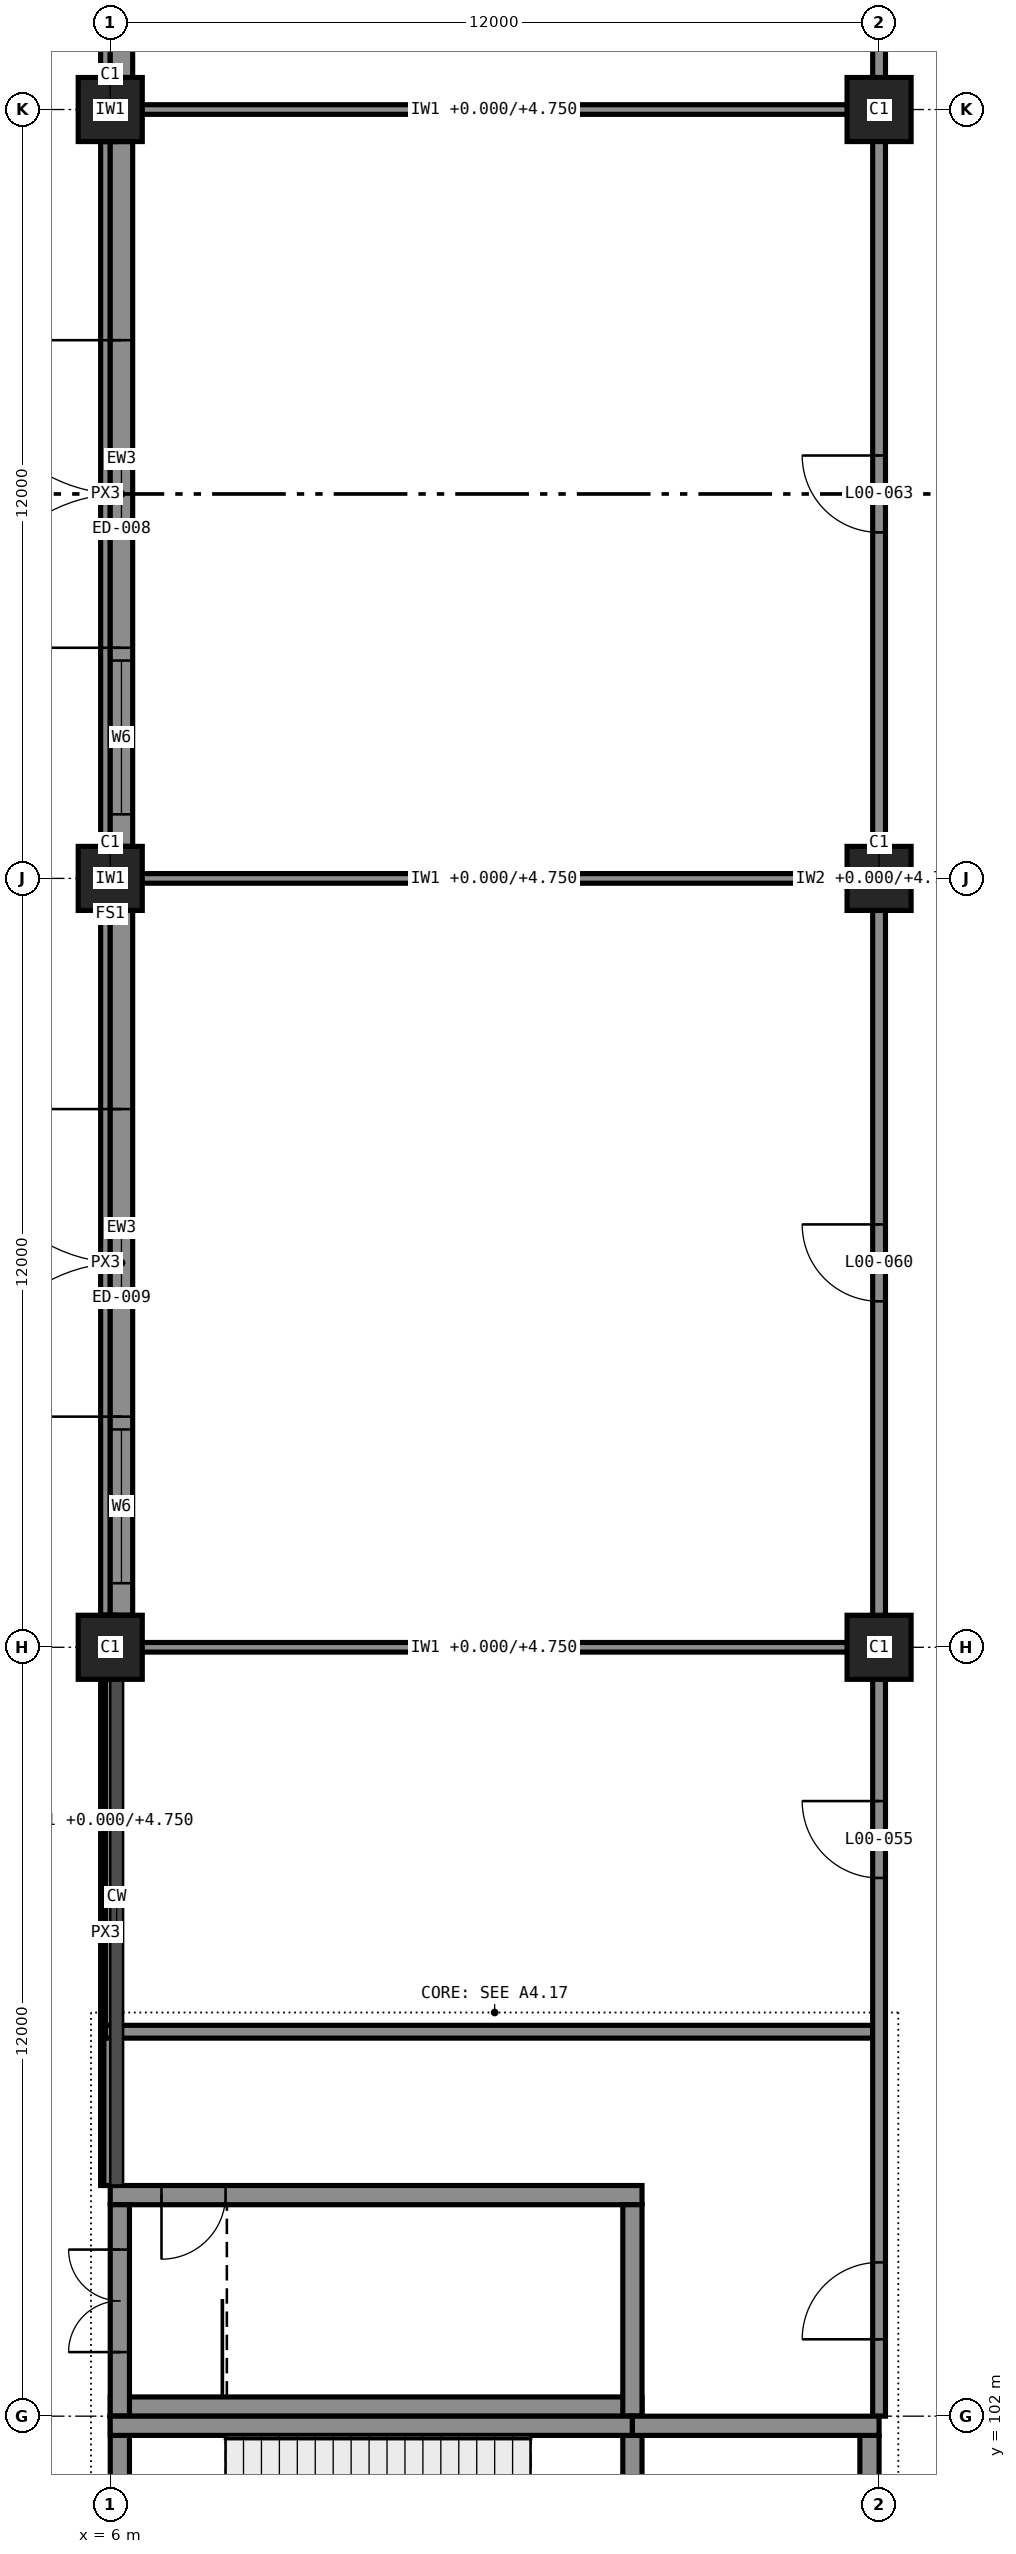
"""IFC4 building model, lengths in metres.
Left out: names, types, materials, properties, quantities, classifications, styles, units other than length and angle.
Written with IfcOpenShell. Run it as: python <this file> out.ifc"""

import sys

from ifc_helpers import new_model, si_unit, direction, frame, frame_2d, origin, origin_2d, place, context, subcontext, project, spatial, rectangle, extrude, element, fill, save


model = new_model("IFC4")
c1 = context("Model", 3, precision=1e-05, world=origin(), true_north=direction((0.0, 1.0)))
c2 = subcontext(c1, "Body", "Model", "MODEL_VIEW")
j1 = project(units=[si_unit("LENGTHUNIT", "METRE"), si_unit("PLANEANGLEUNIT", "RADIAN")], contexts=[c1])
p1 = place(None, origin())
s1 = spatial("IfcSite", under=j1, at=p1, CompositionType="ELEMENT")
p2 = place(p1, origin())
s2 = spatial("IfcBuilding", under=s1, at=p2, CompositionType="ELEMENT")
p3 = place(p2, origin())
s3 = spatial("IfcBuildingStorey", under=s2, at=p3, CompositionType="ELEMENT", Elevation=0.0)
for number, where, z_axis, x_axis in (
    (1, (6.0, 114.0, 0.0), (0.0, 0.0, 1.0), (1.0, 0.0, 0.0)),
    (2, (6.0, 126.0, 0.0), (0.0, 0.0, 1.0), (1.0, 0.0, 0.0)),
    (3, (6.0, 138.0, 0.0), (0.0, 0.0, 1.0), (1.0, 0.0, 0.0)),
    (4, (18.0, 114.0, 0.0), (0.0, 0.0, 1.0), (1.0, 0.0, 0.0)),
    (5, (18.0, 126.0, 0.0), (0.0, 0.0, 1.0), (1.0, 0.0, 0.0)),
    (6, (18.0, 138.0, 0.0), (0.0, 0.0, 1.0), (1.0, 0.0, 0.0)),
):
    element("IfcColumn", number, at=place(p3, frame(where, z_axis=z_axis, x_axis=x_axis)), inside=s3, PredefinedType="COLUMN", context=c2, shape_type="SweptSolid", body=[
        extrude(rectangle(XDim=1.0, YDim=1.0, at=origin_2d()), origin(), (0.0, 0.0, 1.0), 6.0),
    ])
p4 = place(p3, frame((6.0, 102.15, 0.0), z_axis=(0.0, 0.0, 1.0), x_axis=(1.0, 0.0, 0.0)))
e7 = element("IfcWall", 7, at=p4, inside=s3, PredefinedType="SHEAR", context=c2, shape_type="SweptSolid", body=[
    extrude(rectangle(XDim=8.3, YDim=0.3, at=frame_2d((4.15, 0.0))), origin(), (0.0, 0.0, 1.0), 5.75),
])
p5 = place(p3, frame((6.0, 105.45, 0.0), z_axis=(0.0, 0.0, 1.0), x_axis=(1.0, 0.0, 0.0)))
e8 = element("IfcWall", 8, at=p5, inside=s3, PredefinedType="SHEAR", context=c2, shape_type="SweptSolid", body=[
    extrude(rectangle(XDim=8.3, YDim=0.3, at=frame_2d((4.15, 0.0))), origin(), (0.0, 0.0, 1.0), 5.75),
])
p6 = place(p5, frame((0.8, 0.0, 0.0)))
e9 = element("IfcOpeningElement", 9, at=p6, cuts=e8, PredefinedType="OPENING", context=c2, shape_type="SweptSolid", body=[
    extrude(rectangle(XDim=1.0, YDim=2.1, at=frame_2d((0.5, 1.05))), frame((0.0, 0.16, 0.0), z_axis=(0.0, -1.0, 0.0), x_axis=(1.0, 0.0, 0.0)), (0.0, 0.0, 1.0), 0.32),
])
p7 = place(p3, frame((6.15, 102.0, 0.0), z_axis=(0.0, 0.0, 1.0), x_axis=(0.0, 1.0, 0.0)))
e10 = element("IfcWall", 10, at=p7, inside=s3, PredefinedType="SHEAR", context=c2, shape_type="SweptSolid", body=[
    extrude(rectangle(XDim=3.3, YDim=0.3, at=frame_2d((1.65, 0.0))), origin(), (0.0, 0.0, 1.0), 5.75),
])
p8 = place(p7, frame((1.0, 0.0, 0.0)))
e11 = element("IfcOpeningElement", 11, at=p8, cuts=e10, PredefinedType="OPENING", context=c2, shape_type="SweptSolid", body=[
    extrude(rectangle(XDim=1.6, YDim=2.1, at=frame_2d((0.8, 1.05))), frame((0.0, 0.16, 0.0), z_axis=(0.0, -1.0, 0.0), x_axis=(1.0, 0.0, 0.0)), (0.0, 0.0, 1.0), 0.32),
])
p9 = place(p3, frame((14.15, 102.0, 0.0), z_axis=(0.0, 0.0, 1.0), x_axis=(0.0, 1.0, 0.0)))
e12 = element("IfcWall", 12, at=p9, inside=s3, PredefinedType="SHEAR", context=c2, shape_type="SweptSolid", body=[
    extrude(rectangle(XDim=3.3, YDim=0.3, at=frame_2d((1.65, 0.0))), origin(), (0.0, 0.0, 1.0), 5.75),
])
p10 = place(p3, frame((6.0, 101.85, 0.0), z_axis=(0.0, 0.0, 1.0), x_axis=(1.0, 0.0, 0.0)))
e13 = element("IfcWall", 13, at=p10, inside=s3, PredefinedType="SHEAR", context=c2, shape_type="SweptSolid", body=[
    extrude(rectangle(XDim=8.15, YDim=0.3, at=frame_2d((4.075, 0.0))), origin(), (0.0, 0.0, 1.0), 5.75),
])
p11 = place(p3, frame((14.15, 101.85, 0.0), z_axis=(0.0, 0.0, 1.0), x_axis=(1.0, 0.0, 0.0)))
e14 = element("IfcWall", 14, at=p11, inside=s3, PredefinedType="SHEAR", context=c2, shape_type="SweptSolid", body=[
    extrude(rectangle(XDim=3.85, YDim=0.3, at=frame_2d((1.925, 0.0))), origin(), (0.0, 0.0, 1.0), 5.75),
])
p12 = place(p3, frame((6.15, 98.55, 0.0), z_axis=(0.0, 0.0, 1.0), x_axis=(0.0, 1.0, 0.0)))
e15 = element("IfcWall", 15, at=p12, inside=s3, PredefinedType="SHEAR", context=c2, shape_type="SweptSolid", body=[
    extrude(rectangle(XDim=3.45, YDim=0.3, at=frame_2d((1.725, 0.0))), origin(), (0.0, 0.0, 1.0), 5.75),
])
p13 = place(p12, frame((0.85, 0.0, 0.0)))
e16 = element("IfcOpeningElement", 16, at=p13, cuts=e15, PredefinedType="OPENING", context=c2, shape_type="SweptSolid", body=[
    extrude(rectangle(XDim=1.6, YDim=2.1, at=frame_2d((0.8, 1.05))), frame((0.0, 0.16, 0.0), z_axis=(0.0, -1.0, 0.0), x_axis=(1.0, 0.0, 0.0)), (0.0, 0.0, 1.0), 0.32),
])
p14 = place(p3, frame((17.85, 98.55, 0.0), z_axis=(0.0, 0.0, 1.0), x_axis=(0.0, 1.0, 0.0)))
e17 = element("IfcWall", 17, at=p14, inside=s3, PredefinedType="SHEAR", context=c2, shape_type="SweptSolid", body=[
    extrude(rectangle(XDim=3.15, YDim=0.3, at=frame_2d((1.575, 0.0))), origin(), (0.0, 0.0, 1.0), 5.75),
])
p15 = place(p14, frame((1.15, 0.0, 0.0)))
e18 = element("IfcOpeningElement", 18, at=p15, cuts=e17, PredefinedType="OPENING", context=c2, shape_type="SweptSolid", body=[
    extrude(rectangle(XDim=1.0, YDim=2.1, at=frame_2d((0.5, 1.05))), frame((0.0, 0.16, 0.0), z_axis=(0.0, -1.0, 0.0), x_axis=(1.0, 0.0, 0.0)), (0.0, 0.0, 1.0), 0.32),
])
p16 = place(p3, frame((14.15, 98.7, 0.0), z_axis=(0.0, 0.0, 1.0), x_axis=(0.0, 1.0, 0.0)))
e19 = element("IfcWall", 19, at=p16, inside=s3, PredefinedType="SHEAR", context=c2, shape_type="SweptSolid", body=[
    extrude(rectangle(XDim=3.3, YDim=0.3, at=frame_2d((1.65, 0.0))), origin(), (0.0, 0.0, 1.0), 5.75),
])
p17 = place(p3, frame((6.175, 150.0, 0.0), z_axis=(0.0, 0.0, 1.0), x_axis=(0.0, -1.0, 0.0)))
e20 = element("IfcWall", 20, at=p17, inside=s3, PredefinedType="STANDARD", context=c2, shape_type="SweptSolid", body=[
    extrude(rectangle(XDim=11.5, YDim=0.35, at=frame_2d((5.75, 0.0))), origin(), (0.0, 0.0, 1.0), 4.75),
])
p18 = place(p17, frame((8.6, 0.0, 0.45)))
e21 = element("IfcOpeningElement", 21, at=p18, cuts=e20, PredefinedType="OPENING", context=c2, shape_type="SweptSolid", body=[
    extrude(rectangle(XDim=2.4, YDim=3.0, at=frame_2d((1.2, 1.5))), frame((0.0, 0.185, 0.0), z_axis=(0.0, -1.0, 0.0), x_axis=(1.0, 0.0, 0.0)), (0.0, 0.0, 1.0), 0.37),
])
p19 = place(p17, frame((3.6, 0.0, 0.0)))
e22 = element("IfcOpeningElement", 22, at=p19, cuts=e20, PredefinedType="OPENING", context=c2, shape_type="SweptSolid", body=[
    extrude(rectangle(XDim=4.8, YDim=2.4, at=frame_2d((2.4, 1.2))), frame((0.0, 0.185, 0.0), z_axis=(0.0, -1.0, 0.0), x_axis=(1.0, 0.0, 0.0)), (0.0, 0.0, 1.0), 0.37),
])
p20 = place(p3, frame((5.925, 150.0, 5.75), z_axis=(0.0, 0.0, 1.0), x_axis=(0.0, -1.0, 0.0)))
e23 = element("IfcWall", 23, at=p20, inside=s3, PredefinedType="STANDARD", context=c2, shape_type="SweptSolid", body=[
    extrude(rectangle(XDim=11.5, YDim=0.15, at=frame_2d((5.75, 0.0))), origin(), (0.0, 0.0, 1.0), 0.25),
])
p21 = place(p3, frame((6.175, 137.5, 0.0), z_axis=(0.0, 0.0, 1.0), x_axis=(0.0, -1.0, 0.0)))
e24 = element("IfcWall", 24, at=p21, inside=s3, PredefinedType="STANDARD", context=c2, shape_type="SweptSolid", body=[
    extrude(rectangle(XDim=11.0, YDim=0.35, at=frame_2d((5.5, 0.0))), origin(), (0.0, 0.0, 1.0), 4.75),
])
p22 = place(p21, frame((8.1, 0.0, 0.45)))
e25 = element("IfcOpeningElement", 25, at=p22, cuts=e24, PredefinedType="OPENING", context=c2, shape_type="SweptSolid", body=[
    extrude(rectangle(XDim=2.4, YDim=3.0, at=frame_2d((1.2, 1.5))), frame((0.0, 0.185, 0.0), z_axis=(0.0, -1.0, 0.0), x_axis=(1.0, 0.0, 0.0)), (0.0, 0.0, 1.0), 0.37),
])
p23 = place(p21, frame((3.1, 0.0, 0.0)))
e26 = element("IfcOpeningElement", 26, at=p23, cuts=e24, PredefinedType="OPENING", context=c2, shape_type="SweptSolid", body=[
    extrude(rectangle(XDim=4.8, YDim=2.4, at=frame_2d((2.4, 1.2))), frame((0.0, 0.185, 0.0), z_axis=(0.0, -1.0, 0.0), x_axis=(1.0, 0.0, 0.0)), (0.0, 0.0, 1.0), 0.37),
])
p24 = place(p3, frame((5.925, 137.5, 5.75), z_axis=(0.0, 0.0, 1.0), x_axis=(0.0, -1.0, 0.0)))
e27 = element("IfcWall", 27, at=p24, inside=s3, PredefinedType="STANDARD", context=c2, shape_type="SweptSolid", body=[
    extrude(rectangle(XDim=11.0, YDim=0.15, at=frame_2d((5.5, 0.0))), origin(), (0.0, 0.0, 1.0), 0.25),
])
p25 = place(p3, frame((6.175, 125.5, 0.0), z_axis=(0.0, 0.0, 1.0), x_axis=(0.0, -1.0, 0.0)))
e28 = element("IfcWall", 28, at=p25, inside=s3, PredefinedType="STANDARD", context=c2, shape_type="SweptSolid", body=[
    extrude(rectangle(XDim=11.0, YDim=0.35, at=frame_2d((5.5, 0.0))), origin(), (0.0, 0.0, 1.0), 4.75),
])
p26 = place(p25, frame((8.1, 0.0, 0.45)))
e29 = element("IfcOpeningElement", 29, at=p26, cuts=e28, PredefinedType="OPENING", context=c2, shape_type="SweptSolid", body=[
    extrude(rectangle(XDim=2.4, YDim=3.0, at=frame_2d((1.2, 1.5))), frame((0.0, 0.185, 0.0), z_axis=(0.0, -1.0, 0.0), x_axis=(1.0, 0.0, 0.0)), (0.0, 0.0, 1.0), 0.37),
])
p27 = place(p25, frame((3.1, 0.0, 0.0)))
e30 = element("IfcOpeningElement", 30, at=p27, cuts=e28, PredefinedType="OPENING", context=c2, shape_type="SweptSolid", body=[
    extrude(rectangle(XDim=4.8, YDim=2.4, at=frame_2d((2.4, 1.2))), frame((0.0, 0.185, 0.0), z_axis=(0.0, -1.0, 0.0), x_axis=(1.0, 0.0, 0.0)), (0.0, 0.0, 1.0), 0.37),
])
p28 = place(p3, frame((5.925, 125.5, 5.75), z_axis=(0.0, 0.0, 1.0), x_axis=(0.0, -1.0, 0.0)))
e31 = element("IfcWall", 31, at=p28, inside=s3, PredefinedType="STANDARD", context=c2, shape_type="SweptSolid", body=[
    extrude(rectangle(XDim=11.0, YDim=0.15, at=frame_2d((5.5, 0.0))), origin(), (0.0, 0.0, 1.0), 0.25),
])
p29 = place(p3, frame((5.925, 113.5, 5.75), z_axis=(0.0, 0.0, 1.0), x_axis=(0.0, -1.0, 0.0)))
e32 = element("IfcWall", 32, at=p29, inside=s3, PredefinedType="STANDARD", context=c2, shape_type="SweptSolid", body=[
    extrude(rectangle(XDim=7.9, YDim=0.15, at=frame_2d((3.95, 0.0))), origin(), (0.0, 0.0, 1.0), 0.25),
])
p30 = place(p3, frame((5.925, 108.0, 0.0), z_axis=(0.0, 0.0, 1.0), x_axis=(1.0, 0.0, 0.0)))
e33 = element("IfcWall", 33, at=p30, inside=s3, PredefinedType="PARTITIONING", context=c2, shape_type="SweptSolid", body=[
    extrude(rectangle(XDim=11.975, YDim=0.2, at=frame_2d((5.987, 0.0))), origin(), (0.0, 0.0, 1.0), 5.75),
])
for number, where, z_axis, x_axis in (
    (34, (6.075, 114.0, 0.0), (0.0, 0.0, 1.0), (1.0, 0.0, 0.0)),
    (35, (6.075, 126.0, 0.0), (0.0, 0.0, 1.0), (1.0, 0.0, 0.0)),
    (36, (6.075, 138.0, 0.0), (0.0, 0.0, 1.0), (1.0, 0.0, 0.0)),
):
    element("IfcWall", number, at=place(p3, frame(where, z_axis=z_axis, x_axis=x_axis)), inside=s3, PredefinedType="PARTITIONING", context=c2, shape_type="SweptSolid", body=[
        extrude(rectangle(XDim=11.825, YDim=0.15, at=frame_2d((5.913, 0.0))), origin(), (0.0, 0.0, 1.0), 4.75),
    ])
p31 = place(p3, frame((6.0, 105.6, 0.0), z_axis=(0.0, 0.0, 1.0), x_axis=(0.0, 1.0, 0.0)))
e37 = element("IfcWall", 37, at=p31, inside=s3, PredefinedType="PARTITIONING", context=c2, shape_type="SweptSolid", body=[
    extrude(rectangle(XDim=2.3, YDim=0.2, at=frame_2d((1.15, 0.0))), origin(), (0.0, 0.0, 1.0), 4.75),
])
p32 = place(p3, frame((6.0, 108.1, 0.0), z_axis=(0.0, 0.0, 1.0), x_axis=(0.0, 1.0, 0.0)))
e38 = element("IfcWall", 38, at=p32, inside=s3, PredefinedType="PARTITIONING", context=c2, shape_type="SweptSolid", body=[
    extrude(rectangle(XDim=6.4, YDim=0.15, at=frame_2d((3.2, 0.0))), origin(), (0.0, 0.0, 1.0), 4.75),
])
for number, where, z_axis, x_axis in (
    (39, (6.0, 125.5, 0.0), (0.0, 0.0, 1.0), (0.0, 1.0, 0.0)),
    (40, (6.0, 137.5, 0.0), (0.0, 0.0, 1.0), (0.0, 1.0, 0.0)),
):
    element("IfcWall", number, at=place(p3, frame(where, z_axis=z_axis, x_axis=x_axis)), inside=s3, PredefinedType="PARTITIONING", context=c2, shape_type="SweptSolid", body=[
        extrude(rectangle(XDim=1.0, YDim=0.15, at=frame_2d((0.5, 0.0))), origin(), (0.0, 0.0, 1.0), 5.75),
    ])
p33 = place(p3, frame((18.0, 102.0, 0.0), z_axis=(0.0, 0.0, 1.0), x_axis=(0.0, 1.0, 0.0)))
e41 = element("IfcWall", 41, at=p33, inside=s3, PredefinedType="PARTITIONING", context=c2, shape_type="SweptSolid", body=[
    extrude(rectangle(XDim=48.0, YDim=0.2, at=frame_2d((24.0, 0.0))), origin(), (0.0, 0.0, 1.0), 4.75),
])
p34 = place(p33, frame((1.2, 0.0, 0.0)))
e42 = element("IfcOpeningElement", 42, at=p34, cuts=e41, PredefinedType="OPENING", context=c2, shape_type="SweptSolid", body=[
    extrude(rectangle(XDim=1.2, YDim=2.1, at=frame_2d((0.6, 1.05))), frame((0.0, 0.11, 0.0), z_axis=(0.0, -1.0, 0.0), x_axis=(1.0, 0.0, 0.0)), (0.0, 0.0, 1.0), 0.22),
])
p35 = place(p33, frame((8.4, 0.0, 0.0)))
e43 = element("IfcOpeningElement", 43, at=p35, cuts=e41, PredefinedType="OPENING", context=c2, shape_type="SweptSolid", body=[
    extrude(rectangle(XDim=1.2, YDim=2.1, at=frame_2d((0.6, 1.05))), frame((0.0, 0.11, 0.0), z_axis=(0.0, -1.0, 0.0), x_axis=(1.0, 0.0, 0.0)), (0.0, 0.0, 1.0), 0.22),
])
p36 = place(p33, frame((17.4, 0.0, 0.0)))
e44 = element("IfcOpeningElement", 44, at=p36, cuts=e41, PredefinedType="OPENING", context=c2, shape_type="SweptSolid", body=[
    extrude(rectangle(XDim=1.2, YDim=2.1, at=frame_2d((0.6, 1.05))), frame((0.0, 0.11, 0.0), z_axis=(0.0, -1.0, 0.0), x_axis=(1.0, 0.0, 0.0)), (0.0, 0.0, 1.0), 0.22),
])
p37 = place(p33, frame((29.4, 0.0, 0.0)))
e45 = element("IfcOpeningElement", 45, at=p37, cuts=e41, PredefinedType="OPENING", context=c2, shape_type="SweptSolid", body=[
    extrude(rectangle(XDim=1.2, YDim=2.1, at=frame_2d((0.6, 1.05))), frame((0.0, 0.11, 0.0), z_axis=(0.0, -1.0, 0.0), x_axis=(1.0, 0.0, 0.0)), (0.0, 0.0, 1.0), 0.22),
])
p38 = place(p33, frame((41.4, 0.0, 0.0)))
e46 = element("IfcOpeningElement", 46, at=p38, cuts=e41, PredefinedType="OPENING", context=c2, shape_type="SweptSolid", body=[
    extrude(rectangle(XDim=1.2, YDim=2.1, at=frame_2d((0.6, 1.05))), frame((0.0, 0.11, 0.0), z_axis=(0.0, -1.0, 0.0), x_axis=(1.0, 0.0, 0.0)), (0.0, 0.0, 1.0), 0.22),
])
p39 = place(p22, origin())
e47 = element("IfcWindow", 47, at=p39, inside=s3, PartitioningType="SINGLE_PANEL", PredefinedType="WINDOW", context=c2, shape_type="SweptSolid", body=[
    extrude(rectangle(XDim=2.4, YDim=3.0, at=frame_2d((1.2, 1.5))), frame((0.0, 0.03, 0.0), z_axis=(0.0, -1.0, 0.0), x_axis=(1.0, 0.0, 0.0)), (0.0, 0.0, 1.0), 0.06),
])
fill(e25, e47)
p40 = place(p23, frame((4.8, 0.0, 0.0), z_axis=(0.0, 0.0, 1.0), x_axis=(-1.0, 0.0, 0.0)))
e48 = element("IfcDoor", 48, at=p40, inside=s3, OperationType="DOUBLE_DOOR_SINGLE_SWING", PredefinedType="DOOR", context=c2, shape_type="SweptSolid", body=[
    extrude(rectangle(XDim=4.8, YDim=2.4, at=frame_2d((2.4, 1.2))), frame((0.0, 0.025, 0.0), z_axis=(0.0, -1.0, 0.0), x_axis=(1.0, 0.0, 0.0)), (0.0, 0.0, 1.0), 0.05),
])
fill(e26, e48)
p41 = place(p26, origin())
e49 = element("IfcWindow", 49, at=p41, inside=s3, PartitioningType="SINGLE_PANEL", PredefinedType="WINDOW", context=c2, shape_type="SweptSolid", body=[
    extrude(rectangle(XDim=2.4, YDim=3.0, at=frame_2d((1.2, 1.5))), frame((0.0, 0.03, 0.0), z_axis=(0.0, -1.0, 0.0), x_axis=(1.0, 0.0, 0.0)), (0.0, 0.0, 1.0), 0.06),
])
fill(e29, e49)
p42 = place(p27, frame((4.8, 0.0, 0.0), z_axis=(0.0, 0.0, 1.0), x_axis=(-1.0, 0.0, 0.0)))
e50 = element("IfcDoor", 50, at=p42, inside=s3, OperationType="DOUBLE_DOOR_SINGLE_SWING", PredefinedType="DOOR", context=c2, shape_type="SweptSolid", body=[
    extrude(rectangle(XDim=4.8, YDim=2.4, at=frame_2d((2.4, 1.2))), frame((0.0, 0.025, 0.0), z_axis=(0.0, -1.0, 0.0), x_axis=(1.0, 0.0, 0.0)), (0.0, 0.0, 1.0), 0.05),
])
fill(e30, e50)
p43 = place(p8, origin())
e51 = element("IfcDoor", 51, at=p43, inside=s3, OperationType="DOUBLE_DOOR_SINGLE_SWING", PredefinedType="DOOR", context=c2, shape_type="SweptSolid", body=[
    extrude(rectangle(XDim=1.6, YDim=2.1, at=frame_2d((0.8, 1.05))), frame((0.0, 0.025, 0.0), z_axis=(0.0, -1.0, 0.0), x_axis=(1.0, 0.0, 0.0)), (0.0, 0.0, 1.0), 0.05),
])
fill(e11, e51)
p44 = place(p34, origin())
e52 = element("IfcDoor", 52, at=p44, inside=s3, OperationType="SINGLE_SWING_RIGHT", PredefinedType="DOOR", context=c2, shape_type="SweptSolid", body=[
    extrude(rectangle(XDim=1.2, YDim=2.1, at=frame_2d((0.6, 1.05))), frame((0.0, 0.025, 0.0), z_axis=(0.0, -1.0, 0.0), x_axis=(1.0, 0.0, 0.0)), (0.0, 0.0, 1.0), 0.05),
])
fill(e42, e52)
p45 = place(p6, frame((1.0, 0.0, 0.0), z_axis=(0.0, 0.0, 1.0), x_axis=(-1.0, 0.0, 0.0)))
e53 = element("IfcDoor", 53, at=p45, inside=s3, OperationType="SINGLE_SWING_LEFT", PredefinedType="DOOR", context=c2, shape_type="SweptSolid", body=[
    extrude(rectangle(XDim=1.0, YDim=2.1, at=frame_2d((0.5, 1.05))), frame((0.0, 0.025, 0.0), z_axis=(0.0, -1.0, 0.0), x_axis=(1.0, 0.0, 0.0)), (0.0, 0.0, 1.0), 0.05),
])
fill(e9, e53)
p46 = place(p35, origin())
e54 = element("IfcDoor", 54, at=p46, inside=s3, OperationType="SINGLE_SWING_LEFT", PredefinedType="DOOR", context=c2, shape_type="SweptSolid", body=[
    extrude(rectangle(XDim=1.2, YDim=2.1, at=frame_2d((0.6, 1.05))), frame((0.0, 0.025, 0.0), z_axis=(0.0, -1.0, 0.0), x_axis=(1.0, 0.0, 0.0)), (0.0, 0.0, 1.0), 0.05),
])
fill(e43, e54)
p47 = place(p36, origin())
e55 = element("IfcDoor", 55, at=p47, inside=s3, OperationType="SINGLE_SWING_LEFT", PredefinedType="DOOR", context=c2, shape_type="SweptSolid", body=[
    extrude(rectangle(XDim=1.2, YDim=2.1, at=frame_2d((0.6, 1.05))), frame((0.0, 0.025, 0.0), z_axis=(0.0, -1.0, 0.0), x_axis=(1.0, 0.0, 0.0)), (0.0, 0.0, 1.0), 0.05),
])
fill(e44, e55)
p48 = place(p37, origin())
e56 = element("IfcDoor", 56, at=p48, inside=s3, OperationType="SINGLE_SWING_LEFT", PredefinedType="DOOR", context=c2, shape_type="SweptSolid", body=[
    extrude(rectangle(XDim=1.2, YDim=2.1, at=frame_2d((0.6, 1.05))), frame((0.0, 0.025, 0.0), z_axis=(0.0, -1.0, 0.0), x_axis=(1.0, 0.0, 0.0)), (0.0, 0.0, 1.0), 0.05),
])
fill(e45, e56)
save(model, sys.argv[1])
